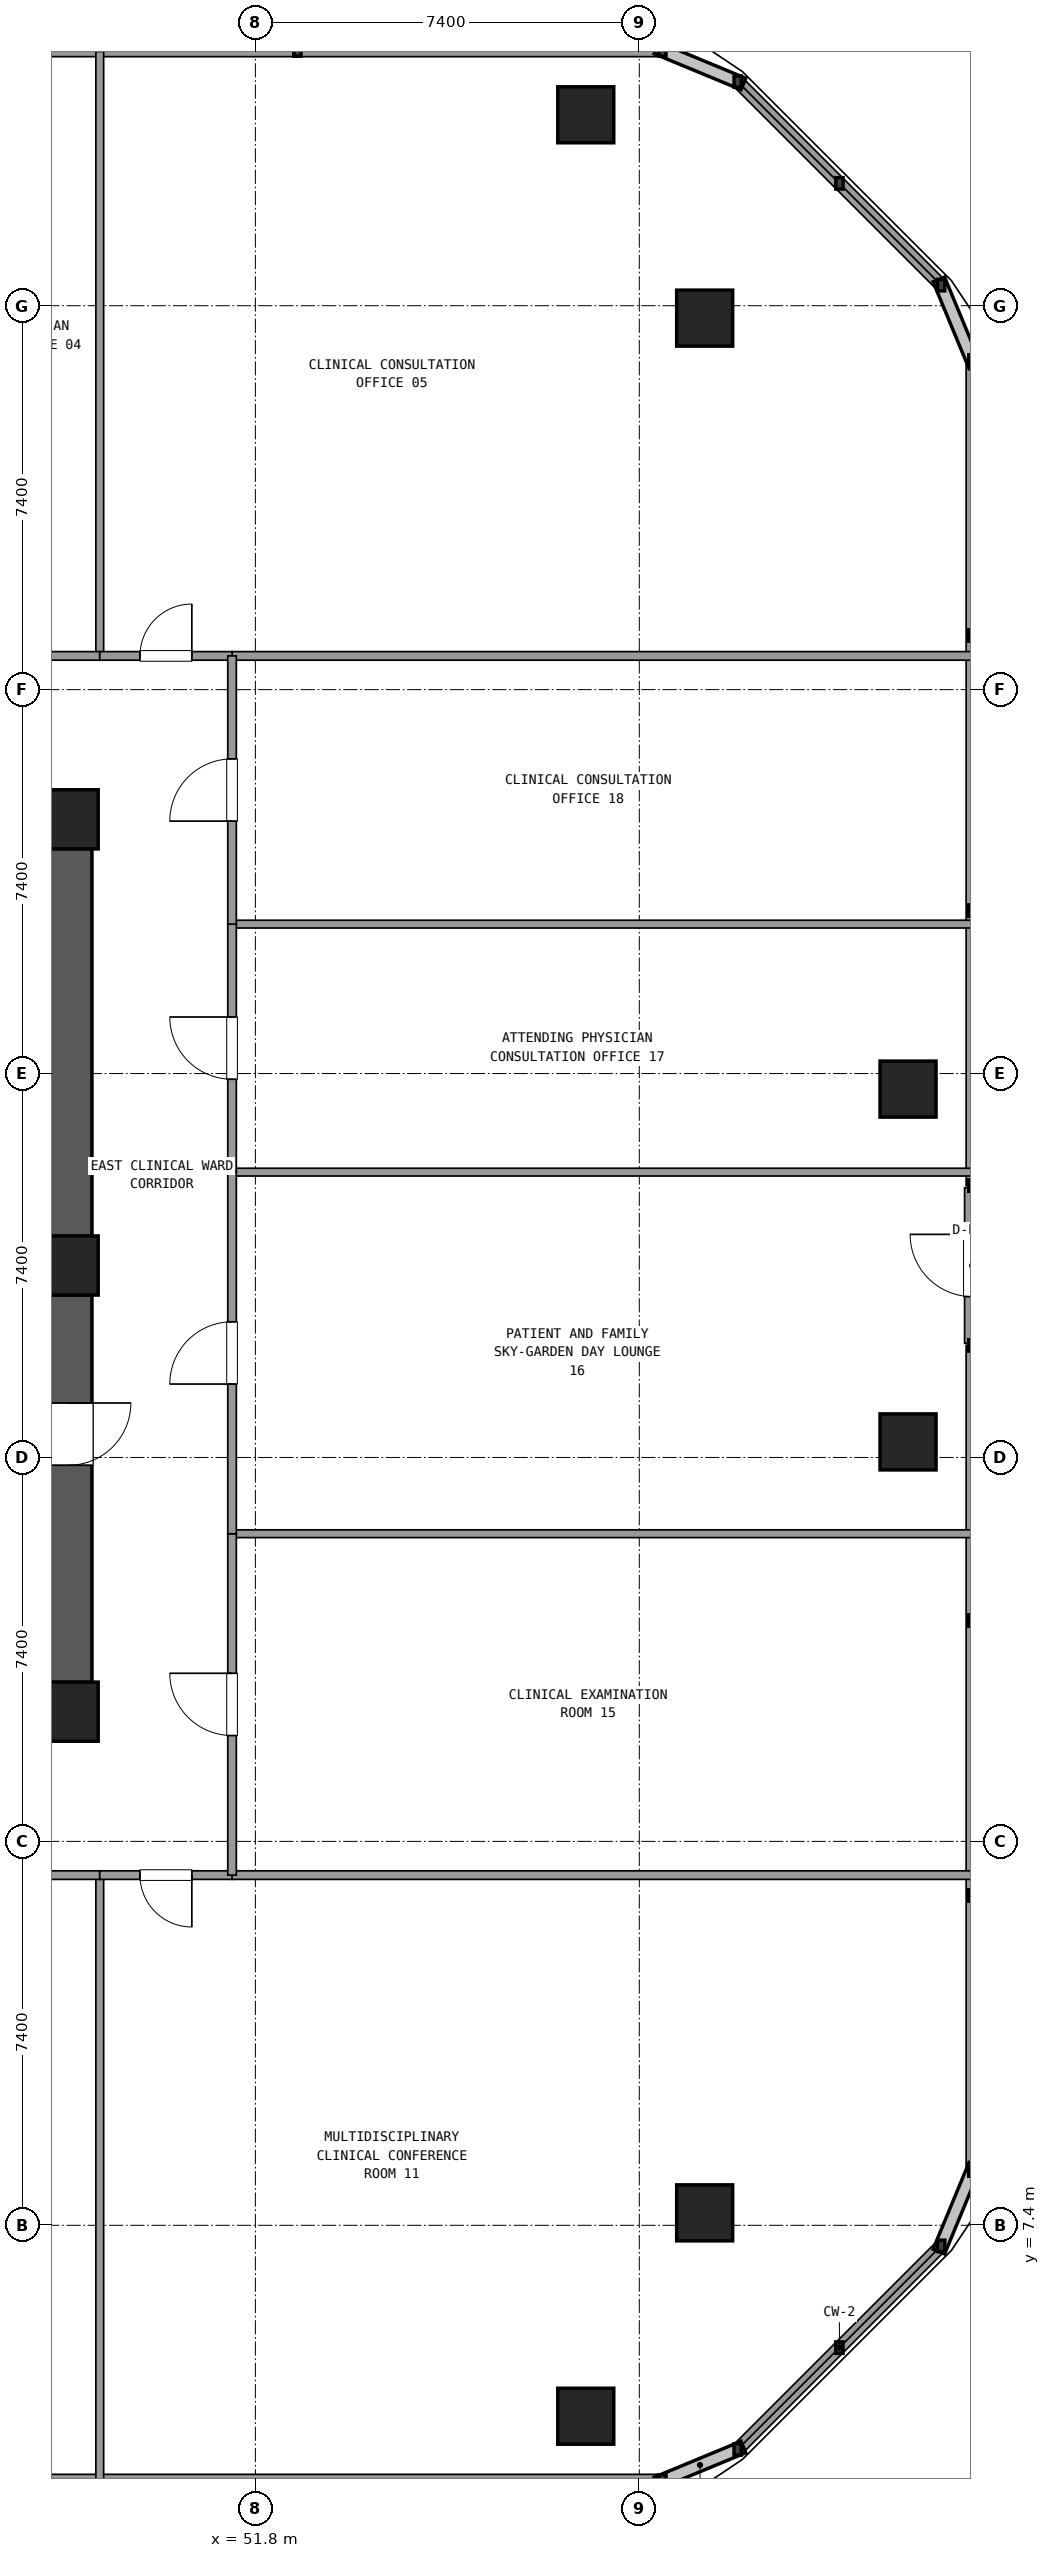
"""IFC4 building model, lengths in metres.
Left out: names, types, materials, properties, quantities, classifications, styles, units other than length and angle.
Written with IfcOpenShell. Run it as: python <this file> out.ifc"""

import sys

from ifc_helpers import new_model, si_unit, direction, frame, frame_2d, origin, origin_2d, place, context, subcontext, project, spatial, rectangle, extrude, element, fill, save


model = new_model("IFC4")
c1 = context("Model", 3, precision=1e-05, world=origin(), true_north=direction((0.0, 1.0)))
c2 = subcontext(c1, "Body", "Model", "MODEL_VIEW")
j1 = project(units=[si_unit("LENGTHUNIT", "METRE"), si_unit("PLANEANGLEUNIT", "RADIAN")], contexts=[c1])
p1 = place(None, origin())
s1 = spatial("IfcSite", under=j1, at=p1, CompositionType="ELEMENT")
p2 = place(p1, origin())
s2 = spatial("IfcBuilding", under=s1, at=p2, CompositionType="ELEMENT")
p3 = place(p2, frame((0.0, 0.0, 31.14)))
s3 = spatial("IfcBuildingStorey", under=s2, at=p3, CompositionType="ELEMENT", Elevation=31.14)
for number, where, z_axis, x_axis in (
    (1, (48.2, 17.3, 0.0), (0.0, 0.0, 1.0), (1.0, 0.0, 0.0)),
    (2, (48.2, 25.9, 0.0), (0.0, 0.0, 1.0), (1.0, 0.0, 0.0)),
    (3, (48.2, 34.5, 0.0), (0.0, 0.0, 1.0), (1.0, 0.0, 0.0)),
):
    element("IfcColumn", number, at=place(p3, frame(where, z_axis=z_axis, x_axis=x_axis)), inside=s3, PredefinedType="COLUMN", context=c2, shape_type="SweptSolid", body=[
        extrude(rectangle(XDim=1.14, YDim=1.14, at=origin_2d()), origin(), (0.0, 0.0, 1.0), 3.6),
    ])
p4 = place(p3, frame((48.2, 17.865, 0.0), z_axis=(0.0, 0.0, 1.0), x_axis=(0.0, 1.0, 0.0)))
e4 = element("IfcWall", 4, at=p4, inside=s3, PredefinedType="SHEAR", context=c2, shape_type="SweptSolid", body=[
    extrude(rectangle(XDim=7.47, YDim=0.9, at=frame_2d((3.735, 0.0))), origin(), (0.0, 0.0, 1.0), 3.32),
])
p5 = place(p4, frame((4.185, 0.0, 0.0)))
e5 = element("IfcOpeningElement", 5, at=p5, cuts=e4, PredefinedType="OPENING", context=c2, shape_type="SweptSolid", body=[
    extrude(rectangle(XDim=1.2, YDim=2.15, at=frame_2d((0.6, 1.075))), frame((0.0, 0.46, 0.0), z_axis=(0.0, -1.0, 0.0), x_axis=(1.0, 0.0, 0.0)), (0.0, 0.0, 1.0), 0.92),
])
p6 = place(p3, frame((48.2, 26.465, 0.0), z_axis=(0.0, 0.0, 1.0), x_axis=(0.0, 1.0, 0.0)))
e6 = element("IfcWall", 6, at=p6, inside=s3, PredefinedType="SHEAR", context=c2, shape_type="SweptSolid", body=[
    extrude(rectangle(XDim=7.47, YDim=0.9, at=frame_2d((3.735, 0.0))), origin(), (0.0, 0.0, 1.0), 3.32),
])
for number, where, z_axis, x_axis in (
    (7, (58.168, 3.72, 0.0), (0.0, 0.0, 1.0), (1.0, 0.0, 0.0)),
    (8, (60.46, 7.64, 0.0), (0.0, 0.0, 1.0), (1.0, 0.0, 0.0)),
    (9, (64.38, 22.5, 0.0), (0.0, 0.0, 1.0), (1.0, 0.0, 0.0)),
    (10, (64.38, 29.3, 0.0), (0.0, 0.0, 1.0), (1.0, 0.0, 0.0)),
    (11, (60.46, 44.16, 0.0), (0.0, 0.0, 1.0), (1.0, 0.0, 0.0)),
    (12, (58.168, 48.08, 0.0), (0.0, 0.0, 1.0), (1.0, 0.0, 0.0)),
):
    element("IfcColumn", number, at=place(p3, frame(where, z_axis=z_axis, x_axis=x_axis)), inside=s3, PredefinedType="COLUMN", context=c2, shape_type="SweptSolid", body=[
        extrude(rectangle(XDim=1.08, YDim=1.08, at=origin_2d()), origin(), (0.0, 0.0, 1.0), 3.6),
    ])
p7 = place(p3, frame((14.355, 2.48, 0.0), z_axis=(0.0, 0.0, 1.0), x_axis=(1.0, 0.0, 0.0)))
e13 = element("IfcWall", 13, at=p7, inside=s3, PredefinedType="SOLIDWALL", context=c2, shape_type="SweptSolid", body=[
    extrude(rectangle(XDim=45.29, YDim=0.24, at=frame_2d((22.645, 0.0))), origin(), (0.0, 0.0, 1.0), 0.85),
])
p8 = place(p3, frame((61.096, 3.081, 0.0), z_axis=(0.0, 0.0, 1.0), x_axis=(0.707128783731, 0.707084777957, 0.0)))
e14 = element("IfcWall", 14, at=p8, inside=s3, PredefinedType="SOLIDWALL", context=c2, shape_type="SweptSolid", body=[
    extrude(rectangle(XDim=5.548, YDim=0.24, at=frame_2d((2.774, 0.0))), origin(), (0.0, 0.0, 1.0), 0.85),
])
p9 = place(p3, frame((65.62, 24.4, 0.0), z_axis=(0.0, 0.0, 1.0), x_axis=(0.0, 1.0, 0.0)))
e15 = element("IfcWall", 15, at=p9, inside=s3, PredefinedType="SOLIDWALL", context=c2, shape_type="SweptSolid", body=[
    extrude(rectangle(XDim=3.0, YDim=0.3, at=frame_2d((1.5, 0.0))), origin(), (0.0, 0.0, 1.0), 2.65),
])
p10 = place(p9, frame((0.9, 0.0, 0.0)))
e16 = element("IfcOpeningElement", 16, at=p10, cuts=e15, PredefinedType="OPENING", context=c2, shape_type="SweptSolid", body=[
    extrude(rectangle(XDim=1.2, YDim=2.2, at=frame_2d((0.6, 1.1))), frame((0.0, 0.16, 0.0), z_axis=(0.0, -1.0, 0.0), x_axis=(1.0, 0.0, 0.0)), (0.0, 0.0, 1.0), 0.32),
])
for number, where, z_axis, x_axis in (
    (17, (65.62, 8.455, 0.0), (0.0, 0.0, 1.0), (0.0, 1.0, 0.0)),
    (18, (65.62, 27.44, 0.0), (0.0, 0.0, 1.0), (0.0, 1.0, 0.0)),
):
    element("IfcWall", number, at=place(p3, frame(where, z_axis=z_axis, x_axis=x_axis)), inside=s3, PredefinedType="SOLIDWALL", context=c2, shape_type="SweptSolid", body=[
        extrude(rectangle(XDim=15.905, YDim=0.24, at=frame_2d((7.953, 0.0))), origin(), (0.0, 0.0, 1.0), 0.85),
    ])
p11 = place(p3, frame((65.019, 44.796, 0.0), z_axis=(0.0, 0.0, 1.0), x_axis=(-0.707106781187, 0.707106781187, 0.0)))
e19 = element("IfcWall", 19, at=p11, inside=s3, PredefinedType="SOLIDWALL", context=c2, shape_type="SweptSolid", body=[
    extrude(rectangle(XDim=5.548, YDim=0.24, at=frame_2d((2.774, 0.0))), origin(), (0.0, 0.0, 1.0), 0.85),
])
p12 = place(p3, frame((59.645, 49.32, 0.0), z_axis=(0.0, 0.0, 1.0), x_axis=(-1.0, 0.0, 0.0)))
e20 = element("IfcWall", 20, at=p12, inside=s3, PredefinedType="SOLIDWALL", context=c2, shape_type="SweptSolid", body=[
    extrude(rectangle(XDim=21.105, YDim=0.24, at=frame_2d((10.552, 0.0))), origin(), (0.0, 0.0, 1.0), 0.85),
])
for number, where, z_axis, x_axis in (
    (21, (51.35, 37.65, 0.0), (0.0, 0.0, 1.0), (1.0, 0.0, 0.0)),
    (22, (51.35, 14.15, 0.0), (0.0, 0.0, 1.0), (1.0, 0.0, 0.0)),
):
    element("IfcWall", number, at=place(p3, frame(where, z_axis=z_axis, x_axis=x_axis)), inside=s3, PredefinedType="PARTITIONING", context=c2, shape_type="SweptSolid", body=[
        extrude(rectangle(XDim=14.25, YDim=0.165, at=frame_2d((7.125, 0.0))), origin(), (0.0, 0.0, 1.0), 2.61),
    ])
p13 = place(p3, frame((48.8, 37.65, 0.0), z_axis=(0.0, 0.0, 1.0), x_axis=(0.0, 1.0, 0.0)))
e23 = element("IfcWall", 23, at=p13, inside=s3, PredefinedType="PARTITIONING", context=c2, shape_type="SweptSolid", body=[
    extrude(rectangle(XDim=11.65, YDim=0.15, at=frame_2d((5.825, 0.0))), origin(), (0.0, 0.0, 1.0), 2.61),
])
p14 = place(p3, frame((44.722, 37.65, 0.0), z_axis=(0.0, 0.0, 1.0), x_axis=(1.0, 0.0, 0.0)))
e24 = element("IfcWall", 24, at=p14, inside=s3, PredefinedType="PARTITIONING", context=c2, shape_type="SweptSolid", body=[
    extrude(rectangle(XDim=4.078, YDim=0.165, at=frame_2d((2.039, 0.0))), origin(), (0.0, 0.0, 1.0), 2.61),
])
p15 = place(p14, frame((1.439, 0.0, 0.0)))
e25 = element("IfcOpeningElement", 25, at=p15, cuts=e24, PredefinedType="OPENING", context=c2, shape_type="SweptSolid", body=[
    extrude(rectangle(XDim=1.2, YDim=2.15, at=frame_2d((0.6, 1.075))), frame((0.0, 0.093, 0.0), z_axis=(0.0, -1.0, 0.0), x_axis=(1.0, 0.0, 0.0)), (0.0, 0.0, 1.0), 0.185),
])
p16 = place(p3, frame((48.8, 37.65, 0.0), z_axis=(0.0, 0.0, 1.0), x_axis=(1.0, 0.0, 0.0)))
e26 = element("IfcWall", 26, at=p16, inside=s3, PredefinedType="PARTITIONING", context=c2, shape_type="SweptSolid", body=[
    extrude(rectangle(XDim=2.55, YDim=0.165, at=frame_2d((1.275, 0.0))), origin(), (0.0, 0.0, 1.0), 2.61),
])
p17 = place(p16, frame((0.775, 0.0, 0.0)))
e27 = element("IfcOpeningElement", 27, at=p17, cuts=e26, PredefinedType="OPENING", context=c2, shape_type="SweptSolid", body=[
    extrude(rectangle(XDim=1.0, YDim=2.15, at=frame_2d((0.5, 1.075))), frame((0.0, 0.093, 0.0), z_axis=(0.0, -1.0, 0.0), x_axis=(1.0, 0.0, 0.0)), (0.0, 0.0, 1.0), 0.185),
])
p18 = place(p3, frame((48.8, 14.15, 0.0), z_axis=(0.0, 0.0, 1.0), x_axis=(0.0, -1.0, 0.0)))
e28 = element("IfcWall", 28, at=p18, inside=s3, PredefinedType="PARTITIONING", context=c2, shape_type="SweptSolid", body=[
    extrude(rectangle(XDim=11.65, YDim=0.15, at=frame_2d((5.825, 0.0))), origin(), (0.0, 0.0, 1.0), 2.61),
])
p19 = place(p3, frame((40.31, 14.15, 0.0), z_axis=(0.0, 0.0, 1.0), x_axis=(1.0, 0.0, 0.0)))
e29 = element("IfcWall", 29, at=p19, inside=s3, PredefinedType="PARTITIONING", context=c2, shape_type="SweptSolid", body=[
    extrude(rectangle(XDim=8.49, YDim=0.165, at=frame_2d((4.245, 0.0))), origin(), (0.0, 0.0, 1.0), 2.61),
])
p20 = place(p19, frame((3.645, 0.0, 0.0)))
e30 = element("IfcOpeningElement", 30, at=p20, cuts=e29, PredefinedType="OPENING", context=c2, shape_type="SweptSolid", body=[
    extrude(rectangle(XDim=1.2, YDim=2.15, at=frame_2d((0.6, 1.075))), frame((0.0, 0.093, 0.0), z_axis=(0.0, -1.0, 0.0), x_axis=(1.0, 0.0, 0.0)), (0.0, 0.0, 1.0), 0.185),
])
p21 = place(p3, frame((48.8, 14.15, 0.0), z_axis=(0.0, 0.0, 1.0), x_axis=(1.0, 0.0, 0.0)))
e31 = element("IfcWall", 31, at=p21, inside=s3, PredefinedType="PARTITIONING", context=c2, shape_type="SweptSolid", body=[
    extrude(rectangle(XDim=2.55, YDim=0.165, at=frame_2d((1.275, 0.0))), origin(), (0.0, 0.0, 1.0), 2.61),
])
p22 = place(p21, frame((0.775, 0.0, 0.0)))
e32 = element("IfcOpeningElement", 32, at=p22, cuts=e31, PredefinedType="OPENING", context=c2, shape_type="SweptSolid", body=[
    extrude(rectangle(XDim=1.0, YDim=2.15, at=frame_2d((0.5, 1.075))), frame((0.0, 0.093, 0.0), z_axis=(0.0, -1.0, 0.0), x_axis=(1.0, 0.0, 0.0)), (0.0, 0.0, 1.0), 0.185),
])
p23 = place(p3, frame((51.35, 20.73, 0.0), z_axis=(0.0, 0.0, 1.0), x_axis=(1.0, 0.0, 0.0)))
e33 = element("IfcWall", 33, at=p23, inside=s3, PredefinedType="PARTITIONING", context=c2, shape_type="SweptSolid", body=[
    extrude(rectangle(XDim=14.25, YDim=0.15, at=frame_2d((7.125, 0.0))), origin(), (0.0, 0.0, 1.0), 2.61),
])
p24 = place(p3, frame((51.35, 14.15, 0.0), z_axis=(0.0, 0.0, 1.0), x_axis=(0.0, 1.0, 0.0)))
e34 = element("IfcWall", 34, at=p24, inside=s3, PredefinedType="PARTITIONING", context=c2, shape_type="SweptSolid", body=[
    extrude(rectangle(XDim=6.58, YDim=0.165, at=frame_2d((3.29, 0.0))), origin(), (0.0, 0.0, 1.0), 2.61),
])
p25 = place(p24, frame((2.69, 0.0, 0.0)))
e35 = element("IfcOpeningElement", 35, at=p25, cuts=e34, PredefinedType="OPENING", context=c2, shape_type="SweptSolid", body=[
    extrude(rectangle(XDim=1.2, YDim=2.15, at=frame_2d((0.6, 1.075))), frame((0.0, 0.093, 0.0), z_axis=(0.0, -1.0, 0.0), x_axis=(1.0, 0.0, 0.0)), (0.0, 0.0, 1.0), 0.185),
])
p26 = place(p3, frame((51.35, 27.7, 0.0), z_axis=(0.0, 0.0, 1.0), x_axis=(1.0, 0.0, 0.0)))
e36 = element("IfcWall", 36, at=p26, inside=s3, PredefinedType="PARTITIONING", context=c2, shape_type="SweptSolid", body=[
    extrude(rectangle(XDim=14.25, YDim=0.15, at=frame_2d((7.125, 0.0))), origin(), (0.0, 0.0, 1.0), 2.61),
])
p27 = place(p3, frame((51.35, 20.73, 0.0), z_axis=(0.0, 0.0, 1.0), x_axis=(0.0, 1.0, 0.0)))
e37 = element("IfcWall", 37, at=p27, inside=s3, PredefinedType="PARTITIONING", context=c2, shape_type="SweptSolid", body=[
    extrude(rectangle(XDim=6.97, YDim=0.165, at=frame_2d((3.485, 0.0))), origin(), (0.0, 0.0, 1.0), 2.61),
])
p28 = place(p27, frame((2.885, 0.0, 0.0)))
e38 = element("IfcOpeningElement", 38, at=p28, cuts=e37, PredefinedType="OPENING", context=c2, shape_type="SweptSolid", body=[
    extrude(rectangle(XDim=1.2, YDim=2.15, at=frame_2d((0.6, 1.075))), frame((0.0, 0.093, 0.0), z_axis=(0.0, -1.0, 0.0), x_axis=(1.0, 0.0, 0.0)), (0.0, 0.0, 1.0), 0.185),
])
p29 = place(p3, frame((51.35, 32.48, 0.0), z_axis=(0.0, 0.0, 1.0), x_axis=(1.0, 0.0, 0.0)))
e39 = element("IfcWall", 39, at=p29, inside=s3, PredefinedType="PARTITIONING", context=c2, shape_type="SweptSolid", body=[
    extrude(rectangle(XDim=14.25, YDim=0.15, at=frame_2d((7.125, 0.0))), origin(), (0.0, 0.0, 1.0), 2.61),
])
p30 = place(p3, frame((51.35, 27.7, 0.0), z_axis=(0.0, 0.0, 1.0), x_axis=(0.0, 1.0, 0.0)))
e40 = element("IfcWall", 40, at=p30, inside=s3, PredefinedType="PARTITIONING", context=c2, shape_type="SweptSolid", body=[
    extrude(rectangle(XDim=4.78, YDim=0.165, at=frame_2d((2.39, 0.0))), origin(), (0.0, 0.0, 1.0), 2.61),
])
p31 = place(p30, frame((1.79, 0.0, 0.0)))
e41 = element("IfcOpeningElement", 41, at=p31, cuts=e40, PredefinedType="OPENING", context=c2, shape_type="SweptSolid", body=[
    extrude(rectangle(XDim=1.2, YDim=2.15, at=frame_2d((0.6, 1.075))), frame((0.0, 0.093, 0.0), z_axis=(0.0, -1.0, 0.0), x_axis=(1.0, 0.0, 0.0)), (0.0, 0.0, 1.0), 0.185),
])
p32 = place(p3, frame((51.35, 32.48, 0.0), z_axis=(0.0, 0.0, 1.0), x_axis=(0.0, 1.0, 0.0)))
e42 = element("IfcWall", 42, at=p32, inside=s3, PredefinedType="PARTITIONING", context=c2, shape_type="SweptSolid", body=[
    extrude(rectangle(XDim=5.17, YDim=0.165, at=frame_2d((2.585, 0.0))), origin(), (0.0, 0.0, 1.0), 2.61),
])
p33 = place(p32, frame((1.985, 0.0, 0.0)))
e43 = element("IfcOpeningElement", 43, at=p33, cuts=e42, PredefinedType="OPENING", context=c2, shape_type="SweptSolid", body=[
    extrude(rectangle(XDim=1.2, YDim=2.15, at=frame_2d((0.6, 1.075))), frame((0.0, 0.093, 0.0), z_axis=(0.0, -1.0, 0.0), x_axis=(1.0, 0.0, 0.0)), (0.0, 0.0, 1.0), 0.185),
])
p34 = place(p5, frame((1.2, 0.0, 0.0), z_axis=(0.0, 0.0, 1.0), x_axis=(-1.0, 0.0, 0.0)))
e44 = element("IfcDoor", 44, at=p34, inside=s3, OperationType="SINGLE_SWING_RIGHT", PredefinedType="DOOR", context=c2, shape_type="SweptSolid", body=[
    extrude(rectangle(XDim=1.2, YDim=2.15, at=frame_2d((0.6, 1.075))), frame((0.0, 0.025, 0.0), z_axis=(0.0, -1.0, 0.0), x_axis=(1.0, 0.0, 0.0)), (0.0, 0.0, 1.0), 0.05),
])
fill(e5, e44)
p35 = place(p17, origin())
e45 = element("IfcDoor", 45, at=p35, inside=s3, OperationType="SINGLE_SWING_RIGHT", PredefinedType="DOOR", context=c2, shape_type="SweptSolid", body=[
    extrude(rectangle(XDim=1.0, YDim=2.15, at=frame_2d((0.5, 1.075))), frame((0.0, 0.025, 0.0), z_axis=(0.0, -1.0, 0.0), x_axis=(1.0, 0.0, 0.0)), (0.0, 0.0, 1.0), 0.05),
])
fill(e27, e45)
p36 = place(p22, frame((1.0, 0.0, 0.0), z_axis=(0.0, 0.0, 1.0), x_axis=(-1.0, 0.0, 0.0)))
e46 = element("IfcDoor", 46, at=p36, inside=s3, OperationType="SINGLE_SWING_RIGHT", PredefinedType="DOOR", context=c2, shape_type="SweptSolid", body=[
    extrude(rectangle(XDim=1.0, YDim=2.15, at=frame_2d((0.5, 1.075))), frame((0.0, 0.025, 0.0), z_axis=(0.0, -1.0, 0.0), x_axis=(1.0, 0.0, 0.0)), (0.0, 0.0, 1.0), 0.05),
])
fill(e32, e46)
p37 = place(p25, origin())
e47 = element("IfcDoor", 47, at=p37, inside=s3, OperationType="SINGLE_SWING_RIGHT", PredefinedType="DOOR", context=c2, shape_type="SweptSolid", body=[
    extrude(rectangle(XDim=1.2, YDim=2.15, at=frame_2d((0.6, 1.075))), frame((0.0, 0.025, 0.0), z_axis=(0.0, -1.0, 0.0), x_axis=(1.0, 0.0, 0.0)), (0.0, 0.0, 1.0), 0.05),
])
fill(e35, e47)
p38 = place(p28, origin())
e48 = element("IfcDoor", 48, at=p38, inside=s3, OperationType="SINGLE_SWING_LEFT", PredefinedType="DOOR", context=c2, shape_type="SweptSolid", body=[
    extrude(rectangle(XDim=1.2, YDim=2.15, at=frame_2d((0.6, 1.075))), frame((0.0, 0.025, 0.0), z_axis=(0.0, -1.0, 0.0), x_axis=(1.0, 0.0, 0.0)), (0.0, 0.0, 1.0), 0.05),
])
fill(e38, e48)
p39 = place(p31, origin())
e49 = element("IfcDoor", 49, at=p39, inside=s3, OperationType="SINGLE_SWING_RIGHT", PredefinedType="DOOR", context=c2, shape_type="SweptSolid", body=[
    extrude(rectangle(XDim=1.2, YDim=2.15, at=frame_2d((0.6, 1.075))), frame((0.0, 0.025, 0.0), z_axis=(0.0, -1.0, 0.0), x_axis=(1.0, 0.0, 0.0)), (0.0, 0.0, 1.0), 0.05),
])
fill(e41, e49)
p40 = place(p33, origin())
e50 = element("IfcDoor", 50, at=p40, inside=s3, OperationType="SINGLE_SWING_LEFT", PredefinedType="DOOR", context=c2, shape_type="SweptSolid", body=[
    extrude(rectangle(XDim=1.2, YDim=2.15, at=frame_2d((0.6, 1.075))), frame((0.0, 0.025, 0.0), z_axis=(0.0, -1.0, 0.0), x_axis=(1.0, 0.0, 0.0)), (0.0, 0.0, 1.0), 0.05),
])
fill(e43, e50)
save(model, sys.argv[1])
